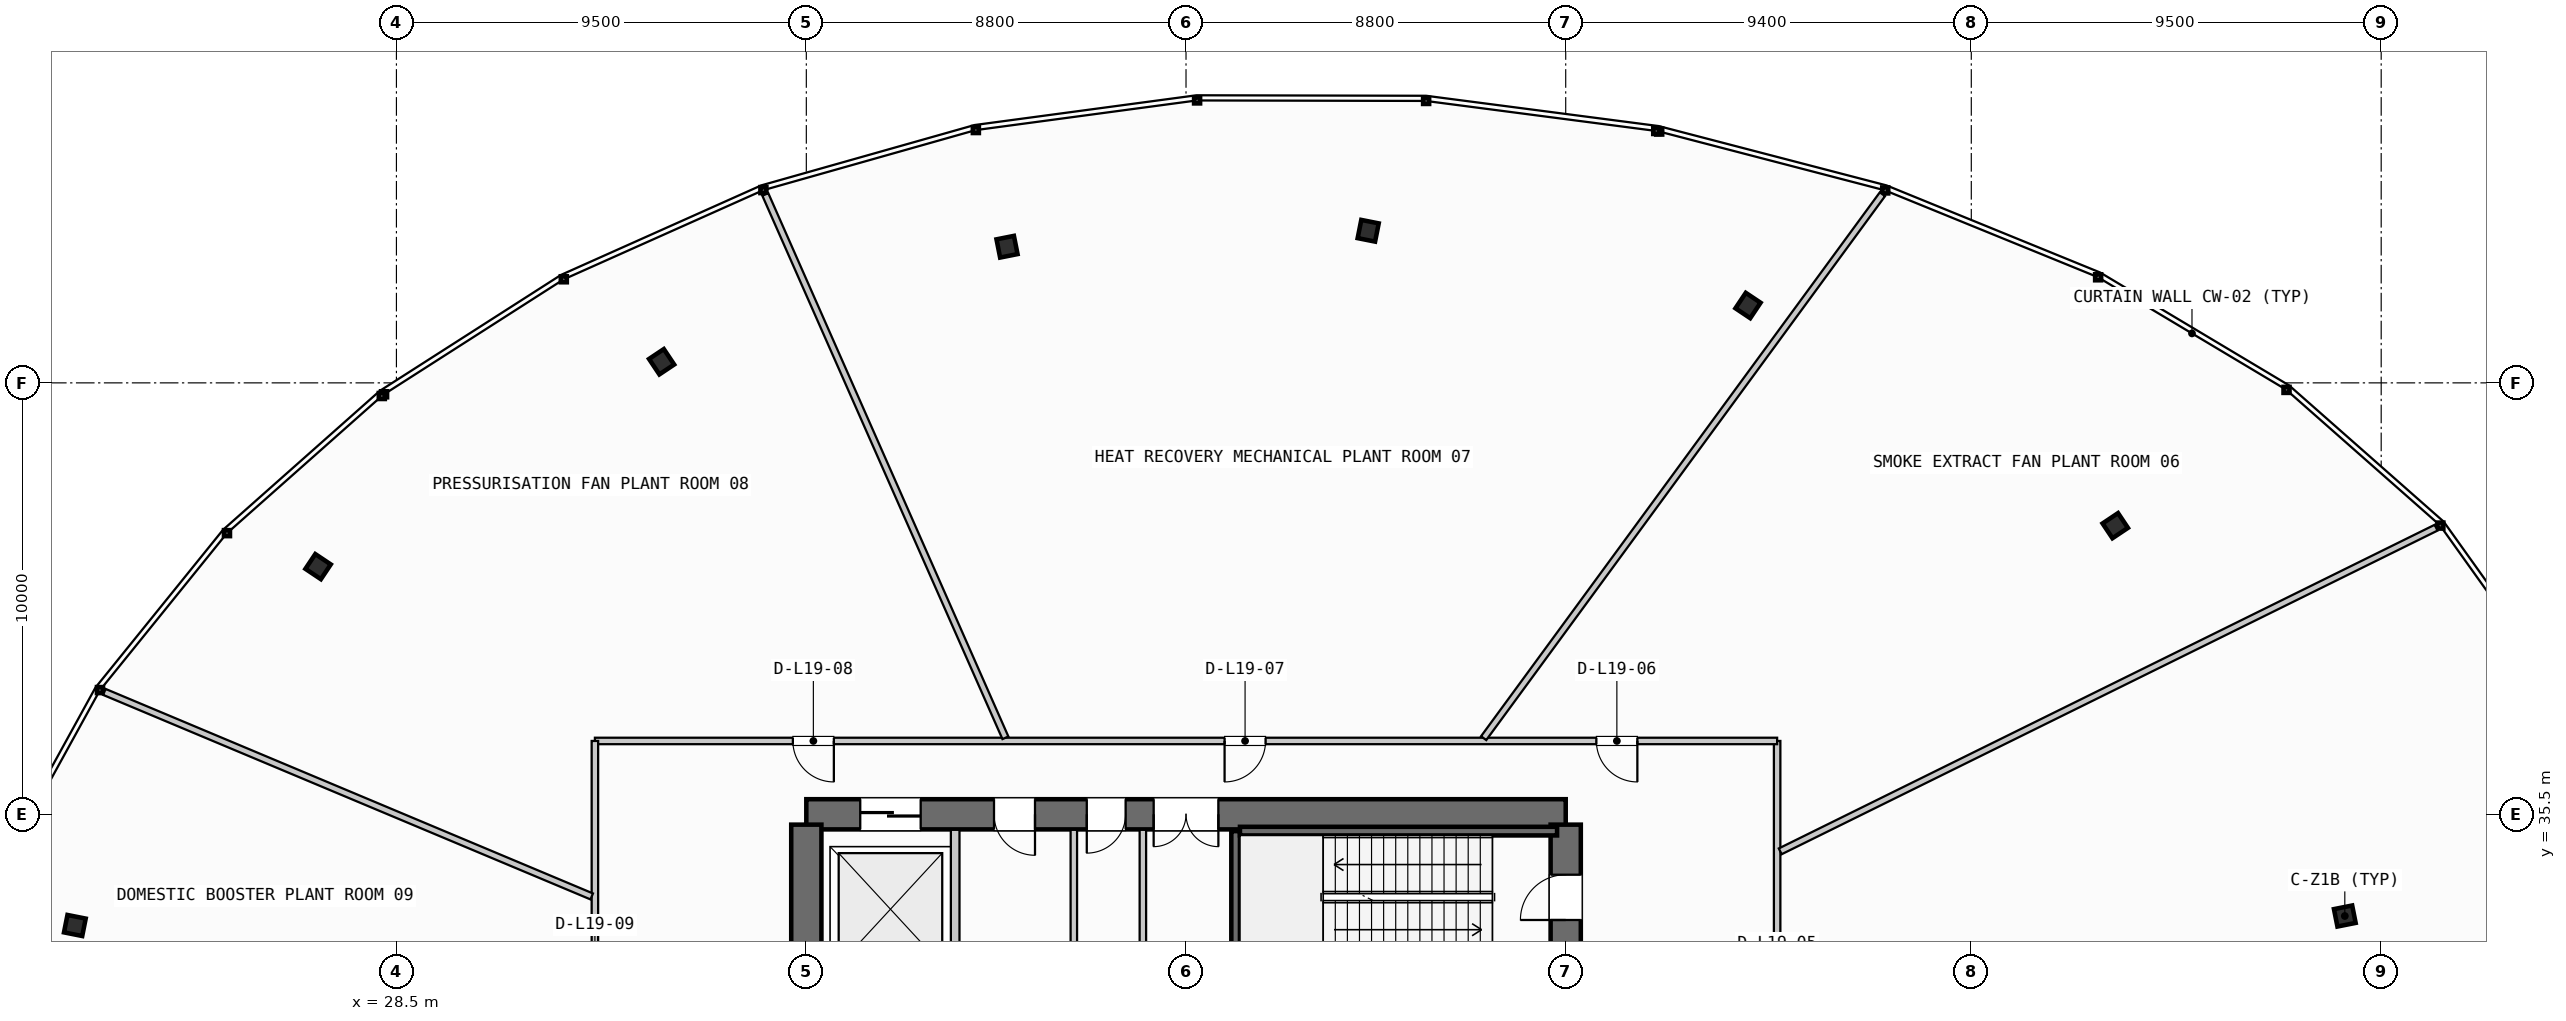
"""IFC4 building model, lengths in metres.
Left out: names, types, materials, properties, quantities, classifications, styles, units other than length and angle.
Written with IfcOpenShell. Run it as: python <this file> out.ifc"""

import sys

from ifc_helpers import new_model, si_unit, direction, frame, frame_2d, origin, origin_2d, place, context, subcontext, project, spatial, rectangle, i_section, extrude, source, transform, mapped, element, fill, save


model = new_model("IFC4")
c1 = context("Model", 3, precision=1e-05, world=origin(), true_north=direction((0.0, 1.0)))
c2 = subcontext(c1, "Body", "Model", "MODEL_VIEW")
j1 = project(units=[si_unit("LENGTHUNIT", "METRE"), si_unit("PLANEANGLEUNIT", "RADIAN")], contexts=[c1])
p1 = place(None, origin())
s1 = spatial("IfcSite", under=j1, at=p1, CompositionType="ELEMENT")
p2 = place(p1, origin())
s2 = spatial("IfcBuilding", under=s1, at=p2, CompositionType="ELEMENT")
p3 = place(p2, frame((0.0, 0.0, 80.4)))
s3 = spatial("IfcBuildingStorey", under=s2, at=p3, CompositionType="ELEMENT", Elevation=80.4)
p4 = place(p3, frame((55.6, 35.5, 0.0), z_axis=(0.0, 0.0, 1.0), x_axis=(-1.0, 0.0, 0.0)))
e1 = element("IfcWall", 1, at=p4, inside=s3, PredefinedType="SHEAR", context=c2, shape_type="SweptSolid", body=[
    extrude(rectangle(XDim=17.6, YDim=0.7, at=frame_2d((8.8, 0.0))), origin(), (0.0, 0.0, 1.0), 4.76),
])
p5 = place(p4, frame((8.05, 0.0, 0.0)))
e2 = element("IfcOpeningElement", 2, at=p5, cuts=e1, PredefinedType="OPENING", context=c2, shape_type="SweptSolid", body=[
    extrude(rectangle(XDim=1.5, YDim=2.2, at=frame_2d((0.75, 1.1))), frame((0.0, 0.36, 0.0), z_axis=(0.0, -1.0, 0.0), x_axis=(1.0, 0.0, 0.0)), (0.0, 0.0, 1.0), 0.72),
])
p6 = place(p4, frame((14.95, 0.0, 0.0)))
e3 = element("IfcOpeningElement", 3, at=p6, cuts=e1, PredefinedType="OPENING", context=c2, shape_type="SweptSolid", body=[
    extrude(rectangle(XDim=1.4, YDim=2.3, at=frame_2d((0.7, 1.15))), frame((0.0, 0.36, 0.0), z_axis=(0.0, -1.0, 0.0), x_axis=(1.0, 0.0, 0.0)), (0.0, 0.0, 1.0), 0.72),
])
p7 = place(p4, frame((12.3, 0.0, 0.0)))
e4 = element("IfcOpeningElement", 4, at=p7, cuts=e1, PredefinedType="OPENING", context=c2, shape_type="SweptSolid", body=[
    extrude(rectangle(XDim=0.95, YDim=2.15, at=frame_2d((0.475, 1.075))), frame((0.0, 0.36, 0.0), z_axis=(0.0, -1.0, 0.0), x_axis=(1.0, 0.0, 0.0)), (0.0, 0.0, 1.0), 0.72),
])
p8 = place(p4, frame((10.2, 0.0, 0.0)))
e5 = element("IfcOpeningElement", 5, at=p8, cuts=e1, PredefinedType="OPENING", context=c2, shape_type="SweptSolid", body=[
    extrude(rectangle(XDim=0.9, YDim=2.15, at=frame_2d((0.45, 1.075))), frame((0.0, 0.36, 0.0), z_axis=(0.0, -1.0, 0.0), x_axis=(1.0, 0.0, 0.0)), (0.0, 0.0, 1.0), 0.72),
])
p9 = place(p3, frame((38.0, 35.26, 0.0), z_axis=(0.0, 0.0, 1.0), x_axis=(0.0, -1.0, 0.0)))
e6 = element("IfcWall", 6, at=p9, inside=s3, PredefinedType="SHEAR", context=c2, shape_type="SweptSolid", body=[
    extrude(rectangle(XDim=14.92, YDim=0.7, at=frame_2d((7.46, 0.0))), origin(), (0.0, 0.0, 1.0), 4.76),
])
p10 = place(p9, frame((5.21, 0.0, 0.0)))
e7 = element("IfcOpeningElement", 7, at=p10, cuts=e6, PredefinedType="OPENING", context=c2, shape_type="SweptSolid", body=[
    extrude(rectangle(XDim=1.1, YDim=2.2, at=frame_2d((0.55, 1.1))), frame((0.0, 0.36, 0.0), z_axis=(0.0, -1.0, 0.0), x_axis=(1.0, 0.0, 0.0)), (0.0, 0.0, 1.0), 0.72),
])
p11 = place(p3, frame((55.6, 20.34, 0.0), z_axis=(0.0, 0.0, 1.0), x_axis=(0.0, 1.0, 0.0)))
e8 = element("IfcWall", 8, at=p11, inside=s3, PredefinedType="SHEAR", context=c2, shape_type="SweptSolid", body=[
    extrude(rectangle(XDim=14.92, YDim=0.7, at=frame_2d((7.46, 0.0))), origin(), (0.0, 0.0, 1.0), 4.76),
])
p12 = place(p11, frame((12.71, 0.0, 0.0)))
e9 = element("IfcOpeningElement", 9, at=p12, cuts=e8, PredefinedType="OPENING", context=c2, shape_type="SweptSolid", body=[
    extrude(rectangle(XDim=1.05, YDim=2.15, at=frame_2d((0.525, 1.075))), frame((0.0, 0.36, 0.0), z_axis=(0.0, -1.0, 0.0), x_axis=(1.0, 0.0, 0.0)), (0.0, 0.0, 1.0), 0.72),
])
p13 = place(p11, frame((8.61, 0.0, 0.0)))
e10 = element("IfcOpeningElement", 10, at=p13, cuts=e8, PredefinedType="OPENING", context=c2, shape_type="SweptSolid", body=[
    extrude(rectangle(XDim=1.1, YDim=2.2, at=frame_2d((0.55, 1.1))), frame((0.0, 0.36, 0.0), z_axis=(0.0, -1.0, 0.0), x_axis=(1.0, 0.0, 0.0)), (0.0, 0.0, 1.0), 0.72),
])
m1 = source(origin(), c2, "Body", "SweptSolid", [
    extrude(i_section(OverallWidth=0.412, OverallDepth=0.431, WebThickness=0.042, FlangeThickness=0.068, FilletRadius=0.015, at=origin_2d()), origin(), (0.0, 0.0, 1.0), 4.76),
])
for number, where, z_axis, x_axis in (
    (11, (73.657, 33.142, 0.0), (0.0, 0.0, 1.0), (0.981, 0.195, 0.0)),
    (12, (68.336, 42.19, 0.0), (0.0, 0.0, 1.0), (0.831, 0.556, 0.0)),
    (13, (59.825, 47.293, 0.0), (0.0, 0.0, 1.0), (0.556, 0.831, 0.0)),
    (14, (51.022, 49.026, 0.0), (0.0, 0.0, 1.0), (0.195, 0.981, 0.0)),
    (15, (42.652, 48.656, 0.0), (0.0, 0.0, 1.0), (-0.195, 0.981, 0.0)),
    (16, (34.646, 45.99, 0.0), (0.0, 0.0, 1.0), (-0.556, 0.831, 0.0)),
    (17, (26.685, 41.241, 0.0), (0.0, 0.0, 1.0), (-0.831, 0.556, 0.0)),
    (18, (21.047, 32.923, 0.0), (0.0, 0.0, 1.0), (-0.981, 0.195, 0.0)),
):
    element("IfcColumn", number, at=place(p3, frame(where, z_axis=z_axis, x_axis=x_axis)), inside=s3, PredefinedType="COLUMN", context=c2, shape_type="MappedRepresentation", body=[
        mapped(m1, transform((0.0, 0.0, 0.0), scale=1.0)),
    ])
p14 = place(p3, frame((47.95, 32.05, 0.0), z_axis=(0.0, 0.0, 1.0), x_axis=(0.0, 1.0, 0.0)))
e19 = element("IfcWall", 19, at=p14, inside=s3, PredefinedType="SHEAR", context=c2, shape_type="SweptSolid", body=[
    extrude(rectangle(XDim=3.06, YDim=0.2, at=frame_2d((1.53, 0.0))), origin(), (0.0, 0.0, 1.0), 4.76),
])
p15 = place(p3, frame((48.05, 35.11, 0.0), z_axis=(0.0, 0.0, 1.0), x_axis=(1.0, 0.0, 0.0)))
e20 = element("IfcWall", 20, at=p15, inside=s3, PredefinedType="SHEAR", context=c2, shape_type="SweptSolid", body=[
    extrude(rectangle(XDim=7.35, YDim=0.2, at=frame_2d((3.675, 0.0))), origin(), (0.0, 0.0, 1.0), 4.76),
])
p16 = place(p3, frame((41.45, 31.85, 0.0), z_axis=(0.0, 0.0, 1.0), x_axis=(0.0, 1.0, 0.0)))
e21 = element("IfcWall", 21, at=p16, inside=s3, PredefinedType="PARTITIONING", context=c2, shape_type="SweptSolid", body=[
    extrude(rectangle(XDim=3.29, YDim=0.2, at=frame_2d((1.645, 0.0))), origin(), (0.0, 0.0, 1.0), 2.335),
])
p17 = place(p3, frame((45.8, 31.85, 0.0), z_axis=(0.0, 0.0, 1.0), x_axis=(0.0, 1.0, 0.0)))
e22 = element("IfcWall", 22, at=p17, inside=s3, PredefinedType="PARTITIONING", context=c2, shape_type="SweptSolid", body=[
    extrude(rectangle(XDim=3.29, YDim=0.15, at=frame_2d((1.645, 0.0))), origin(), (0.0, 0.0, 1.0), 2.335),
])
p18 = place(p3, frame((44.2, 31.85, 0.0), z_axis=(0.0, 0.0, 1.0), x_axis=(0.0, 1.0, 0.0)))
e23 = element("IfcWall", 23, at=p18, inside=s3, PredefinedType="PLUMBINGWALL", context=c2, shape_type="SweptSolid", body=[
    extrude(rectangle(XDim=3.29, YDim=0.15, at=frame_2d((1.645, 0.0))), origin(), (0.0, 0.0, 1.0), 2.335),
])
p19 = place(p3, frame((60.5, 18.4, 0.0), z_axis=(0.0, 0.0, 1.0), x_axis=(0.0, 1.0, 0.0)))
e24 = element("IfcWall", 24, at=p19, inside=s3, PredefinedType="PARTITIONING", context=c2, shape_type="SweptSolid", body=[
    extrude(rectangle(XDim=18.8, YDim=0.15, at=frame_2d((9.4, 0.0))), origin(), (0.0, 0.0, 1.0), 2.335),
])
p20 = place(p19, frame((4.504, 0.0, 0.0)))
e25 = element("IfcOpeningElement", 25, at=p20, cuts=e24, PredefinedType="OPENING", context=c2, shape_type="SweptSolid", body=[
    extrude(rectangle(XDim=0.95, YDim=2.15, at=frame_2d((0.475, 1.075))), frame((0.0, 0.085, 0.0), z_axis=(0.0, -1.0, 0.0), x_axis=(1.0, 0.0, 0.0)), (0.0, 0.0, 1.0), 0.17),
])
p21 = place(p19, frame((11.983, 0.0, 0.0)))
e26 = element("IfcOpeningElement", 26, at=p21, cuts=e24, PredefinedType="OPENING", context=c2, shape_type="SweptSolid", body=[
    extrude(rectangle(XDim=0.95, YDim=2.15, at=frame_2d((0.475, 1.075))), frame((0.0, 0.085, 0.0), z_axis=(0.0, -1.0, 0.0), x_axis=(1.0, 0.0, 0.0)), (0.0, 0.0, 1.0), 0.17),
])
p22 = place(p3, frame((60.5, 37.2, 0.0), z_axis=(0.0, 0.0, 1.0), x_axis=(-1.0, 0.0, 0.0)))
e27 = element("IfcWall", 27, at=p22, inside=s3, PredefinedType="PARTITIONING", context=c2, shape_type="SweptSolid", body=[
    extrude(rectangle(XDim=27.4, YDim=0.15, at=frame_2d((13.7, 0.0))), origin(), (0.0, 0.0, 1.0), 2.335),
])
p23 = place(p22, frame((3.24, 0.0, 0.0)))
e28 = element("IfcOpeningElement", 28, at=p23, cuts=e27, PredefinedType="OPENING", context=c2, shape_type="SweptSolid", body=[
    extrude(rectangle(XDim=0.95, YDim=2.15, at=frame_2d((0.475, 1.075))), frame((0.0, 0.085, 0.0), z_axis=(0.0, -1.0, 0.0), x_axis=(1.0, 0.0, 0.0)), (0.0, 0.0, 1.0), 0.17),
])
p24 = place(p22, frame((11.856, 0.0, 0.0)))
e29 = element("IfcOpeningElement", 29, at=p24, cuts=e27, PredefinedType="OPENING", context=c2, shape_type="SweptSolid", body=[
    extrude(rectangle(XDim=0.95, YDim=2.15, at=frame_2d((0.475, 1.075))), frame((0.0, 0.085, 0.0), z_axis=(0.0, -1.0, 0.0), x_axis=(1.0, 0.0, 0.0)), (0.0, 0.0, 1.0), 0.17),
])
p25 = place(p22, frame((21.862, 0.0, 0.0)))
e30 = element("IfcOpeningElement", 30, at=p25, cuts=e27, PredefinedType="OPENING", context=c2, shape_type="SweptSolid", body=[
    extrude(rectangle(XDim=0.95, YDim=2.15, at=frame_2d((0.475, 1.075))), frame((0.0, 0.085, 0.0), z_axis=(0.0, -1.0, 0.0), x_axis=(1.0, 0.0, 0.0)), (0.0, 0.0, 1.0), 0.17),
])
p26 = place(p3, frame((33.1, 37.2, 0.0), z_axis=(0.0, 0.0, 1.0), x_axis=(0.0, -1.0, 0.0)))
e31 = element("IfcWall", 31, at=p26, inside=s3, PredefinedType="PARTITIONING", context=c2, shape_type="SweptSolid", body=[
    extrude(rectangle(XDim=18.8, YDim=0.15, at=frame_2d((9.4, 0.0))), origin(), (0.0, 0.0, 1.0), 2.335),
])
p27 = place(p26, frame((5.441, 0.0, 0.0)))
e32 = element("IfcOpeningElement", 32, at=p27, cuts=e31, PredefinedType="OPENING", context=c2, shape_type="SweptSolid", body=[
    extrude(rectangle(XDim=0.95, YDim=2.15, at=frame_2d((0.475, 1.075))), frame((0.0, 0.085, 0.0), z_axis=(0.0, -1.0, 0.0), x_axis=(1.0, 0.0, 0.0)), (0.0, 0.0, 1.0), 0.17),
])
p28 = place(p26, frame((12.746, 0.0, 0.0)))
e33 = element("IfcOpeningElement", 33, at=p28, cuts=e31, PredefinedType="OPENING", context=c2, shape_type="SweptSolid", body=[
    extrude(rectangle(XDim=0.95, YDim=2.15, at=frame_2d((0.475, 1.075))), frame((0.0, 0.085, 0.0), z_axis=(0.0, -1.0, 0.0), x_axis=(1.0, 0.0, 0.0)), (0.0, 0.0, 1.0), 0.17),
])
p29 = place(p3, frame((60.572, 34.641, 0.0), z_axis=(0.0, 0.0, 1.0), x_axis=(0.896742558372, 0.442552577673, 0.0)))
e34 = element("IfcWall", 34, at=p29, inside=s3, PredefinedType="PARTITIONING", context=c2, shape_type="SweptSolid", body=[
    extrude(rectangle(XDim=16.951, YDim=0.15, at=frame_2d((8.476, 0.0))), origin(), (0.0, 0.0, 1.0), 2.335),
])
p30 = place(p3, frame((53.698, 37.264, 0.0), z_axis=(0.0, 0.0, 1.0), x_axis=(0.591230952175, 0.806502300797, 0.0)))
e35 = element("IfcWall", 35, at=p30, inside=s3, PredefinedType="PARTITIONING", context=c2, shape_type="SweptSolid", body=[
    extrude(rectangle(XDim=15.633, YDim=0.15, at=frame_2d((7.816, 0.0))), origin(), (0.0, 0.0, 1.0), 2.335),
])
p31 = place(p3, frame((42.614, 37.273, 0.0), z_axis=(0.0, 0.0, 1.0), x_axis=(-0.404136937948, 0.914698494252, 0.0)))
e36 = element("IfcWall", 36, at=p31, inside=s3, PredefinedType="PARTITIONING", context=c2, shape_type="SweptSolid", body=[
    extrude(rectangle(XDim=13.769, YDim=0.15, at=frame_2d((6.884, 0.0))), origin(), (0.0, 0.0, 1.0), 2.335),
])
p32 = place(p3, frame((33.026, 33.596, 0.0), z_axis=(0.0, 0.0, 1.0), x_axis=(-0.922101034733, 0.386949197885, 0.0)))
e37 = element("IfcWall", 37, at=p32, inside=s3, PredefinedType="PARTITIONING", context=c2, shape_type="SweptSolid", body=[
    extrude(rectangle(XDim=12.25, YDim=0.15, at=frame_2d((6.125, 0.0))), origin(), (0.0, 0.0, 1.0), 2.335),
])
m2 = source(origin(), c2, "Body", "SweptSolid", [
    extrude(rectangle(XDim=1.05, YDim=2.15, at=frame_2d((0.525, 1.075))), frame((0.0, 0.025, 0.0), z_axis=(0.0, -1.0, 0.0), x_axis=(1.0, 0.0, 0.0)), (0.0, 0.0, 1.0), 0.05),
])
p33 = place(p12, origin())
e38 = element("IfcDoor", 38, at=p33, inside=s3, OperationType="SINGLE_SWING_LEFT", PredefinedType="DOOR", context=c2, shape_type="MappedRepresentation", body=[
    mapped(m2, transform((0.0, 0.0, 0.0), scale=1.0)),
])
fill(e9, e38)
m3 = source(origin(), c2, "Body", "SweptSolid", [
    extrude(rectangle(XDim=1.5, YDim=2.2, at=frame_2d((0.75, 1.1))), frame((0.0, 0.025, 0.0), z_axis=(0.0, -1.0, 0.0), x_axis=(1.0, 0.0, 0.0)), (0.0, 0.0, 1.0), 0.05),
])
p34 = place(p5, origin())
e39 = element("IfcDoor", 39, at=p34, inside=s3, OperationType="DOUBLE_DOOR_SINGLE_SWING", PredefinedType="DOOR", context=c2, shape_type="MappedRepresentation", body=[
    mapped(m3, transform((0.0, 0.0, 0.0), scale=1.0)),
])
fill(e2, e39)
m4 = source(origin(), c2, "Body", "SweptSolid", [
    extrude(rectangle(XDim=1.4, YDim=2.3, at=frame_2d((0.7, 1.15))), frame((0.0, 0.025, 0.0), z_axis=(0.0, -1.0, 0.0), x_axis=(1.0, 0.0, 0.0)), (0.0, 0.0, 1.0), 0.05),
])
p35 = place(p6, origin())
e40 = element("IfcDoor", 40, at=p35, inside=s3, OperationType="SLIDING_TO_RIGHT", PredefinedType="DOOR", context=c2, shape_type="MappedRepresentation", body=[
    mapped(m4, transform((0.0, 0.0, 0.0), scale=1.0)),
])
fill(e3, e40)
m5 = source(origin(), c2, "Body", "SweptSolid", [
    extrude(rectangle(XDim=0.95, YDim=2.15, at=frame_2d((0.475, 1.075))), frame((0.0, 0.025, 0.0), z_axis=(0.0, -1.0, 0.0), x_axis=(1.0, 0.0, 0.0)), (0.0, 0.0, 1.0), 0.05),
])
p36 = place(p7, origin())
e41 = element("IfcDoor", 41, at=p36, inside=s3, OperationType="SINGLE_SWING_LEFT", PredefinedType="DOOR", context=c2, shape_type="MappedRepresentation", body=[
    mapped(m5, transform((0.0, 0.0, 0.0), scale=1.0)),
])
fill(e4, e41)
m6 = source(origin(), c2, "Body", "SweptSolid", [
    extrude(rectangle(XDim=0.9, YDim=2.15, at=frame_2d((0.45, 1.075))), frame((0.0, 0.025, 0.0), z_axis=(0.0, -1.0, 0.0), x_axis=(1.0, 0.0, 0.0)), (0.0, 0.0, 1.0), 0.05),
])
p37 = place(p8, origin())
e42 = element("IfcDoor", 42, at=p37, inside=s3, OperationType="SINGLE_SWING_RIGHT", PredefinedType="DOOR", context=c2, shape_type="MappedRepresentation", body=[
    mapped(m6, transform((0.0, 0.0, 0.0), scale=1.0)),
])
fill(e5, e42)
p38 = place(p23, origin())
e43 = element("IfcDoor", 43, at=p38, inside=s3, OperationType="SINGLE_SWING_LEFT", PredefinedType="DOOR", context=c2, shape_type="MappedRepresentation", body=[
    mapped(m5, transform((0.0, 0.0, 0.0), scale=1.0)),
])
fill(e28, e43)
p39 = place(p24, origin())
e44 = element("IfcDoor", 44, at=p39, inside=s3, OperationType="SINGLE_SWING_RIGHT", PredefinedType="DOOR", context=c2, shape_type="MappedRepresentation", body=[
    mapped(m5, transform((0.0, 0.0, 0.0), scale=1.0)),
])
fill(e29, e44)
p40 = place(p25, origin())
e45 = element("IfcDoor", 45, at=p40, inside=s3, OperationType="SINGLE_SWING_LEFT", PredefinedType="DOOR", context=c2, shape_type="MappedRepresentation", body=[
    mapped(m5, transform((0.0, 0.0, 0.0), scale=1.0)),
])
fill(e30, e45)
save(model, sys.argv[1])
